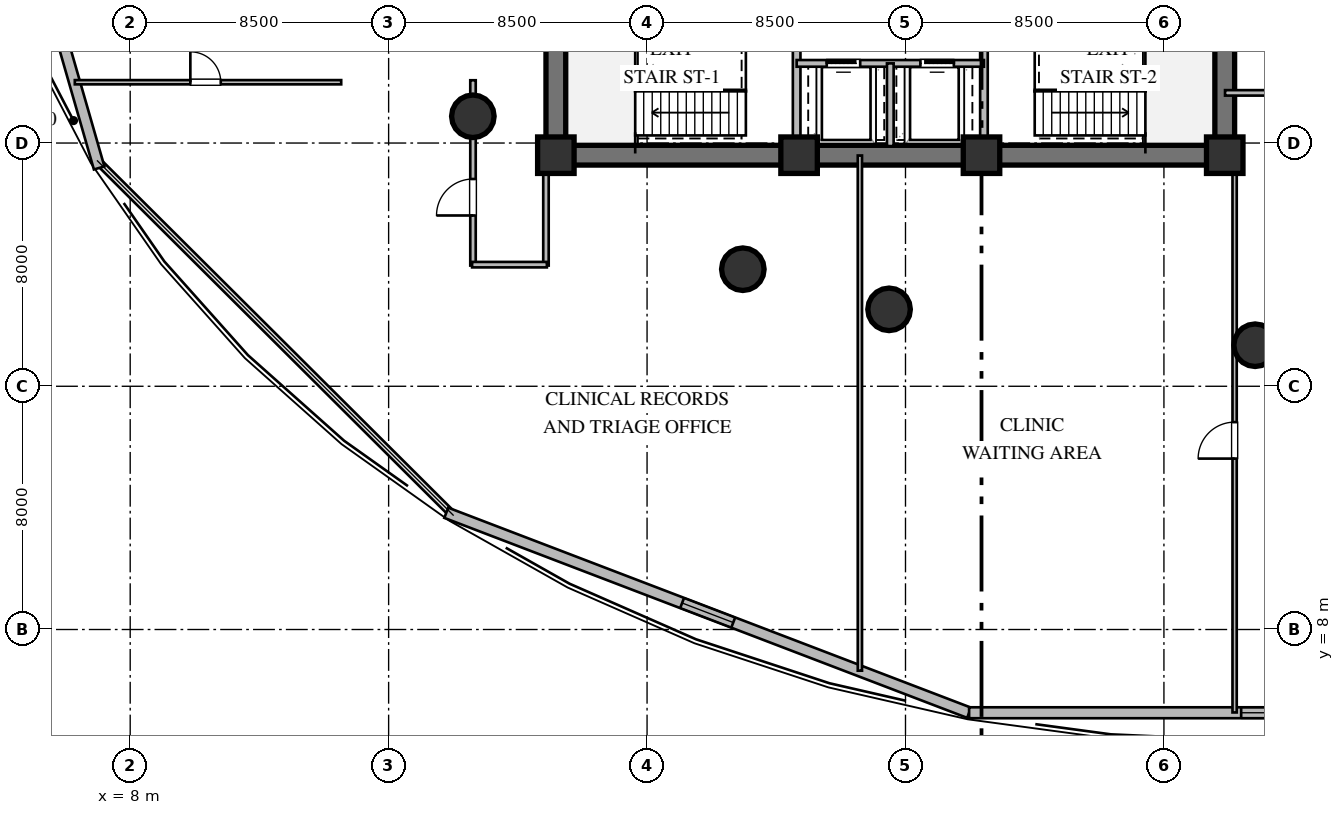
"""IFC4 building model, lengths in metres.
Left out: names, types, materials, properties, quantities, classifications, styles, units other than length and angle.
Written with IfcOpenShell. Run it as: python <this file> out.ifc"""

import sys

from ifc_helpers import new_model, si_unit, direction, frame, frame_2d, origin, origin_2d, place, context, subcontext, project, spatial, rectangle, circle, extrude, element, fill, save


model = new_model("IFC4")
c1 = context("Model", 3, precision=1e-05, world=origin(), true_north=direction((0.0, 1.0)))
c2 = subcontext(c1, "Body", "Model", "MODEL_VIEW")
j1 = project(units=[si_unit("LENGTHUNIT", "METRE"), si_unit("PLANEANGLEUNIT", "RADIAN")], contexts=[c1])
p1 = place(None, origin())
s1 = spatial("IfcSite", under=j1, at=p1, CompositionType="ELEMENT")
p2 = place(p1, origin())
s2 = spatial("IfcBuilding", under=s1, at=p2, CompositionType="ELEMENT")
p3 = place(p2, frame((0.0, 0.0, 19.2)))
s3 = spatial("IfcBuildingStorey", under=s2, at=p3, CompositionType="ELEMENT", Elevation=19.2)
p4 = place(p3, frame((21.675, 23.6, 0.0), z_axis=(0.0, 0.0, 1.0), x_axis=(1.0, 0.0, 0.0)))
e1 = element("IfcWall", 1, at=p4, inside=s3, PredefinedType="SHEAR", context=c2, shape_type="SweptSolid", body=[
    extrude(rectangle(XDim=22.65, YDim=0.65, at=frame_2d((11.325, 0.0))), origin(), (0.0, 0.0, 1.0), 4.56),
])
p5 = place(p3, frame((22.0, 23.925, 0.0), z_axis=(0.0, 0.0, 1.0), x_axis=(0.0, 1.0, 0.0)))
e2 = element("IfcWall", 2, at=p5, inside=s3, PredefinedType="SHEAR", context=c2, shape_type="SweptSolid", body=[
    extrude(rectangle(XDim=12.15, YDim=0.65, at=frame_2d((6.075, 0.0))), origin(), (0.0, 0.0, 1.0), 4.56),
])
p6 = place(p3, frame((44.0, 23.925, 0.0), z_axis=(0.0, 0.0, 1.0), x_axis=(0.0, 1.0, 0.0)))
e3 = element("IfcWall", 3, at=p6, inside=s3, PredefinedType="SHEAR", context=c2, shape_type="SweptSolid", body=[
    extrude(rectangle(XDim=12.15, YDim=0.65, at=frame_2d((6.075, 0.0))), origin(), (0.0, 0.0, 1.0), 4.56),
])
p7 = place(p6, frame((8.775, 0.0, 0.0)))
e4 = element("IfcOpeningElement", 4, at=p7, cuts=e3, PredefinedType="OPENING", context=c2, shape_type="SweptSolid", body=[
    extrude(rectangle(XDim=1.5, YDim=2.15, at=frame_2d((0.75, 1.075))), frame((0.0, 0.335, 0.0), z_axis=(0.0, -1.0, 0.0), x_axis=(1.0, 0.0, 0.0)), (0.0, 0.0, 1.0), 0.67),
])
for number, where, z_axis, x_axis in (
    (5, (22.0, 23.6, 0.0), (0.0, 0.0, 1.0), (1.0, 0.0, 0.0)),
    (6, (30.0, 23.6, 0.0), (0.0, 0.0, 1.0), (1.0, 0.0, 0.0)),
    (7, (36.0, 23.6, 0.0), (0.0, 0.0, 1.0), (1.0, 0.0, 0.0)),
    (8, (44.0, 23.6, 0.0), (0.0, 0.0, 1.0), (1.0, 0.0, 0.0)),
):
    element("IfcColumn", number, at=place(p3, frame(where, z_axis=z_axis, x_axis=x_axis)), inside=s3, PredefinedType="COLUMN", context=c2, shape_type="SweptSolid", body=[
        extrude(rectangle(XDim=1.2, YDim=1.2, at=origin_2d()), origin(), (0.0, 0.0, 1.0), 4.8),
    ])
for number, where, z_axis, x_axis in (
    (9, (19.27, 24.88, 0.0), (0.0, 0.0, 1.0), (1.0, 0.0, 0.0)),
    (10, (28.15, 19.85, 0.0), (0.0, 0.0, 1.0), (1.0, 0.0, 0.0)),
    (11, (32.96, 18.53, 0.0), (0.0, 0.0, 1.0), (1.0, 0.0, 0.0)),
    (12, (45.0, 17.35, 0.0), (0.0, 0.0, 1.0), (1.0, 0.0, 0.0)),
):
    element("IfcColumn", number, at=place(p3, frame(where, z_axis=z_axis, x_axis=x_axis)), inside=s3, PredefinedType="COLUMN", context=c2, shape_type="SweptSolid", body=[
        extrude(circle(Radius=0.7, at=origin_2d()), origin(), (0.0, 0.0, 1.0), 4.8),
    ])
p8 = place(p3, frame((2.72, 38.0, 0.0), z_axis=(0.0, 0.0, 1.0), x_axis=(0.276203409751, -0.961099202186, 0.0)))
e13 = element("IfcWall", 13, at=p8, inside=s3, PredefinedType="STANDARD", context=c2, shape_type="SweptSolid", body=[
    extrude(rectangle(XDim=15.42, YDim=0.36, at=frame_2d((7.71, 0.0))), origin(), (0.0, 0.0, 1.0), 4.56),
])
p9 = place(p8, frame((6.81, 0.0, 1.05)))
e14 = element("IfcOpeningElement", 14, at=p9, cuts=e13, PredefinedType="OPENING", context=c2, shape_type="SweptSolid", body=[
    extrude(rectangle(XDim=1.8, YDim=1.7, at=frame_2d((0.9, 0.85))), frame((0.0, 0.19, 0.0), z_axis=(0.0, -1.0, 0.0), x_axis=(1.0, 0.0, 0.0)), (0.0, 0.0, 1.0), 0.38),
])
p10 = place(p3, frame((18.396, 11.839, 0.0), z_axis=(0.0, 0.0, 1.0), x_axis=(0.934012147289, -0.357241247221, 0.0)))
e15 = element("IfcWall", 15, at=p10, inside=s3, PredefinedType="STANDARD", context=c2, shape_type="SweptSolid", body=[
    extrude(rectangle(XDim=18.411, YDim=0.36, at=frame_2d((9.206, 0.0))), origin(), (0.0, 0.0, 1.0), 4.56),
])
p11 = place(p10, frame((8.305, 0.0, 1.05)))
e16 = element("IfcOpeningElement", 16, at=p11, cuts=e15, PredefinedType="OPENING", context=c2, shape_type="SweptSolid", body=[
    extrude(rectangle(XDim=1.8, YDim=1.7, at=frame_2d((0.9, 0.85))), frame((0.0, 0.19, 0.0), z_axis=(0.0, -1.0, 0.0), x_axis=(1.0, 0.0, 0.0)), (0.0, 0.0, 1.0), 0.38),
])
p12 = place(p3, frame((35.592, 5.262, 0.0), z_axis=(0.0, 0.0, 1.0), x_axis=(1.0, 0.0, 0.0)))
e17 = element("IfcWall", 17, at=p12, inside=s3, PredefinedType="STANDARD", context=c2, shape_type="SweptSolid", body=[
    extrude(rectangle(XDim=18.816, YDim=0.36, at=frame_2d((9.408, 0.0))), origin(), (0.0, 0.0, 1.0), 4.56),
])
p13 = place(p12, frame((8.948, 0.0, 1.05)))
e18 = element("IfcOpeningElement", 18, at=p13, cuts=e17, PredefinedType="OPENING", context=c2, shape_type="SweptSolid", body=[
    extrude(rectangle(XDim=1.8, YDim=1.7, at=frame_2d((0.9, 0.85))), frame((0.0, 0.19, 0.0), z_axis=(0.0, -1.0, 0.0), x_axis=(1.0, 0.0, 0.0)), (0.0, 0.0, 1.0), 0.38),
])
p14 = place(p3, frame((29.92, 23.9, 0.0), z_axis=(0.0, 0.0, 1.0), x_axis=(0.0, 1.0, 0.0)))
e19 = element("IfcWall", 19, at=p14, inside=s3, PredefinedType="SOLIDWALL", context=c2, shape_type="SweptSolid", body=[
    extrude(rectangle(XDim=5.4, YDim=0.25, at=frame_2d((2.7, 0.0))), origin(), (0.0, 0.0, 1.0), 4.56),
])
p15 = place(p14, frame((3.421, 0.0, 0.0)))
e20 = element("IfcOpeningElement", 20, at=p15, cuts=e19, PredefinedType="OPENING", context=c2, shape_type="SweptSolid", body=[
    extrude(rectangle(XDim=1.15, YDim=2.1, at=frame_2d((0.575, 1.05))), frame((0.0, 0.135, 0.0), z_axis=(0.0, -1.0, 0.0), x_axis=(1.0, 0.0, 0.0)), (0.0, 0.0, 1.0), 0.27),
])
p16 = place(p3, frame((36.08, 23.9, 0.0), z_axis=(0.0, 0.0, 1.0), x_axis=(0.0, 1.0, 0.0)))
e21 = element("IfcWall", 21, at=p16, inside=s3, PredefinedType="SOLIDWALL", context=c2, shape_type="SweptSolid", body=[
    extrude(rectangle(XDim=5.4, YDim=0.25, at=frame_2d((2.7, 0.0))), origin(), (0.0, 0.0, 1.0), 4.56),
])
p17 = place(p16, frame((3.421, 0.0, 0.0)))
e22 = element("IfcOpeningElement", 22, at=p17, cuts=e21, PredefinedType="OPENING", context=c2, shape_type="SweptSolid", body=[
    extrude(rectangle(XDim=1.15, YDim=2.1, at=frame_2d((0.575, 1.05))), frame((0.0, 0.135, 0.0), z_axis=(0.0, -1.0, 0.0), x_axis=(1.0, 0.0, 0.0)), (0.0, 0.0, 1.0), 0.27),
])
p18 = place(p3, frame((29.92, 26.62, 0.0), z_axis=(0.0, 0.0, 1.0), x_axis=(1.0, 0.0, 0.0)))
e23 = element("IfcWall", 23, at=p18, inside=s3, PredefinedType="SOLIDWALL", context=c2, shape_type="SweptSolid", body=[
    extrude(rectangle(XDim=6.16, YDim=0.22, at=frame_2d((3.08, 0.0))), origin(), (0.0, 0.0, 1.0), 4.56),
])
p19 = place(p18, frame((0.99, 0.0, 0.0)))
e24 = element("IfcOpeningElement", 24, at=p19, cuts=e23, PredefinedType="OPENING", context=c2, shape_type="SweptSolid", body=[
    extrude(rectangle(XDim=1.1, YDim=2.1, at=frame_2d((0.55, 1.05))), frame((0.0, 0.12, 0.0), z_axis=(0.0, -1.0, 0.0), x_axis=(1.0, 0.0, 0.0)), (0.0, 0.0, 1.0), 0.24),
])
p20 = place(p18, frame((4.07, 0.0, 0.0)))
e25 = element("IfcOpeningElement", 25, at=p20, cuts=e23, PredefinedType="OPENING", context=c2, shape_type="SweptSolid", body=[
    extrude(rectangle(XDim=1.1, YDim=2.1, at=frame_2d((0.55, 1.05))), frame((0.0, 0.12, 0.0), z_axis=(0.0, -1.0, 0.0), x_axis=(1.0, 0.0, 0.0)), (0.0, 0.0, 1.0), 0.24),
])
p21 = place(p3, frame((33.0, 23.9, 0.0), z_axis=(0.0, 0.0, 1.0), x_axis=(0.0, 1.0, 0.0)))
e26 = element("IfcWall", 26, at=p21, inside=s3, PredefinedType="SOLIDWALL", context=c2, shape_type="SweptSolid", body=[
    extrude(rectangle(XDim=2.72, YDim=0.22, at=frame_2d((1.36, 0.0))), origin(), (0.0, 0.0, 1.0), 4.56),
])
p22 = place(p3, frame((62.415, 25.65, 0.0), z_axis=(0.0, 0.0, 1.0), x_axis=(-1.0, 0.0, 0.0)))
e27 = element("IfcWall", 27, at=p22, inside=s3, PredefinedType="PARTITIONING", context=c2, shape_type="SweptSolid", body=[
    extrude(rectangle(XDim=18.405, YDim=0.18, at=frame_2d((9.203, 0.0))), origin(), (0.0, 0.0, 1.0), 4.006),
])
p23 = place(p22, frame((8.46, 0.0, 0.0)))
e28 = element("IfcOpeningElement", 28, at=p23, cuts=e27, PredefinedType="OPENING", context=c2, shape_type="SweptSolid", body=[
    extrude(rectangle(XDim=1.2, YDim=2.15, at=frame_2d((0.6, 1.075))), frame((0.0, 0.1, 0.0), z_axis=(0.0, -1.0, 0.0), x_axis=(1.0, 0.0, 0.0)), (0.0, 0.0, 1.0), 0.2),
])
p24 = place(p3, frame((19.275, 19.97, 0.0), z_axis=(0.0, 0.0, 1.0), x_axis=(0.0, 1.0, 0.0)))
e29 = element("IfcWall", 29, at=p24, inside=s3, PredefinedType="PARTITIONING", context=c2, shape_type="SweptSolid", body=[
    extrude(rectangle(XDim=6.095, YDim=0.18, at=frame_2d((3.047, 0.0))), origin(), (0.0, 0.0, 1.0), 3.938),
])
p25 = place(p24, frame((1.647, 0.0, 0.0)))
e30 = element("IfcOpeningElement", 30, at=p25, cuts=e29, PredefinedType="OPENING", context=c2, shape_type="SweptSolid", body=[
    extrude(rectangle(XDim=1.2, YDim=2.15, at=frame_2d((0.6, 1.075))), frame((0.0, 0.1, 0.0), z_axis=(0.0, -1.0, 0.0), x_axis=(1.0, 0.0, 0.0)), (0.0, 0.0, 1.0), 0.2),
])
p26 = place(p3, frame((21.675, 23.59, 0.0), z_axis=(0.0, 0.0, 1.0), x_axis=(0.0, -1.0, 0.0)))
e31 = element("IfcWall", 31, at=p26, inside=s3, PredefinedType="PARTITIONING", context=c2, shape_type="SweptSolid", body=[
    extrude(rectangle(XDim=3.62, YDim=0.18, at=frame_2d((1.81, 0.0))), origin(), (0.0, 0.0, 1.0), 3.7),
])
p27 = place(p3, frame((21.705, 20.0, 0.0), z_axis=(0.0, 0.0, 1.0), x_axis=(-1.0, 0.0, 0.0)))
e32 = element("IfcWall", 32, at=p27, inside=s3, PredefinedType="PARTITIONING", context=c2, shape_type="SweptSolid", body=[
    extrude(rectangle(XDim=2.46, YDim=0.18, at=frame_2d((1.23, 0.0))), origin(), (0.0, 0.0, 1.0), 4.56),
])
p28 = place(p3, frame((44.325, 5.272, 0.0), z_axis=(0.0, 0.0, 1.0), x_axis=(0.0, 1.0, 0.0)))
e33 = element("IfcWall", 33, at=p28, inside=s3, PredefinedType="PARTITIONING", context=c2, shape_type="SweptSolid", body=[
    extrude(rectangle(XDim=18.318, YDim=0.14, at=frame_2d((9.159, 0.0))), origin(), (0.0, 0.0, 1.0), 3.7),
])
p29 = place(p28, frame((8.349, 0.0, 0.0)))
e34 = element("IfcOpeningElement", 34, at=p29, cuts=e33, PredefinedType="OPENING", context=c2, shape_type="SweptSolid", body=[
    extrude(rectangle(XDim=1.2, YDim=2.15, at=frame_2d((0.6, 1.075))), frame((0.0, 0.08, 0.0), z_axis=(0.0, -1.0, 0.0), x_axis=(1.0, 0.0, 0.0)), (0.0, 0.0, 1.0), 0.16),
])
p30 = place(p3, frame((6.179, 26.0, 0.0), z_axis=(0.0, 0.0, 1.0), x_axis=(1.0, 0.0, 0.0)))
e35 = element("IfcWall", 35, at=p30, inside=s3, PredefinedType="PARTITIONING", context=c2, shape_type="SweptSolid", body=[
    extrude(rectangle(XDim=8.761, YDim=0.14, at=frame_2d((4.381, 0.0))), origin(), (0.0, 0.0, 1.0), 4.56),
])
p31 = place(p30, frame((3.8, 0.0, 0.0)))
e36 = element("IfcOpeningElement", 36, at=p31, cuts=e35, PredefinedType="OPENING", context=c2, shape_type="SweptSolid", body=[
    extrude(rectangle(XDim=1.0, YDim=2.1, at=frame_2d((0.5, 1.05))), frame((0.0, 0.08, 0.0), z_axis=(0.0, -1.0, 0.0), x_axis=(1.0, 0.0, 0.0)), (0.0, 0.0, 1.0), 0.16),
])
p32 = place(p3, frame((32.0, 23.59, 0.0), z_axis=(0.0, 0.0, 1.0), x_axis=(0.0, -1.0, 0.0)))
e37 = element("IfcWall", 37, at=p32, inside=s3, PredefinedType="PARTITIONING", context=c2, shape_type="SweptSolid", body=[
    extrude(rectangle(XDim=16.944, YDim=0.14, at=frame_2d((8.472, 0.0))), origin(), (0.0, 0.0, 1.0), 4.56),
])
p33 = place(p11, origin())
e38 = element("IfcWindow", 38, at=p33, inside=s3, PartitioningType="SINGLE_PANEL", PredefinedType="WINDOW", context=c2, shape_type="SweptSolid", body=[
    extrude(rectangle(XDim=1.8, YDim=1.7, at=frame_2d((0.9, 0.85))), frame((0.0, 0.03, 0.0), z_axis=(0.0, -1.0, 0.0), x_axis=(1.0, 0.0, 0.0)), (0.0, 0.0, 1.0), 0.06),
])
fill(e16, e38)
p34 = place(p13, origin())
e39 = element("IfcWindow", 39, at=p34, inside=s3, PartitioningType="SINGLE_PANEL", PredefinedType="WINDOW", context=c2, shape_type="SweptSolid", body=[
    extrude(rectangle(XDim=1.8, YDim=1.7, at=frame_2d((0.9, 0.85))), frame((0.0, 0.03, 0.0), z_axis=(0.0, -1.0, 0.0), x_axis=(1.0, 0.0, 0.0)), (0.0, 0.0, 1.0), 0.06),
])
fill(e18, e39)
p35 = place(p19, origin())
e40 = element("IfcDoor", 40, at=p35, inside=s3, OperationType="SLIDING_TO_LEFT", PredefinedType="DOOR", context=c2, shape_type="SweptSolid", body=[
    extrude(rectangle(XDim=1.1, YDim=2.1, at=frame_2d((0.55, 1.05))), frame((0.0, 0.025, 0.0), z_axis=(0.0, -1.0, 0.0), x_axis=(1.0, 0.0, 0.0)), (0.0, 0.0, 1.0), 0.05),
])
fill(e24, e40)
p36 = place(p20, origin())
e41 = element("IfcDoor", 41, at=p36, inside=s3, OperationType="SLIDING_TO_RIGHT", PredefinedType="DOOR", context=c2, shape_type="SweptSolid", body=[
    extrude(rectangle(XDim=1.1, YDim=2.1, at=frame_2d((0.55, 1.05))), frame((0.0, 0.025, 0.0), z_axis=(0.0, -1.0, 0.0), x_axis=(1.0, 0.0, 0.0)), (0.0, 0.0, 1.0), 0.05),
])
fill(e25, e41)
p37 = place(p25, origin())
e42 = element("IfcDoor", 42, at=p37, inside=s3, OperationType="SINGLE_SWING_LEFT", PredefinedType="DOOR", context=c2, shape_type="SweptSolid", body=[
    extrude(rectangle(XDim=1.2, YDim=2.15, at=frame_2d((0.6, 1.075))), frame((0.0, 0.025, 0.0), z_axis=(0.0, -1.0, 0.0), x_axis=(1.0, 0.0, 0.0)), (0.0, 0.0, 1.0), 0.05),
])
fill(e30, e42)
p38 = place(p29, origin())
e43 = element("IfcDoor", 43, at=p38, inside=s3, OperationType="SINGLE_SWING_LEFT", PredefinedType="DOOR", context=c2, shape_type="SweptSolid", body=[
    extrude(rectangle(XDim=1.2, YDim=2.15, at=frame_2d((0.6, 1.075))), frame((0.0, 0.025, 0.0), z_axis=(0.0, -1.0, 0.0), x_axis=(1.0, 0.0, 0.0)), (0.0, 0.0, 1.0), 0.05),
])
fill(e34, e43)
p39 = place(p31, origin())
e44 = element("IfcDoor", 44, at=p39, inside=s3, OperationType="SINGLE_SWING_LEFT", PredefinedType="DOOR", context=c2, shape_type="SweptSolid", body=[
    extrude(rectangle(XDim=1.0, YDim=2.1, at=frame_2d((0.5, 1.05))), frame((0.0, 0.025, 0.0), z_axis=(0.0, -1.0, 0.0), x_axis=(1.0, 0.0, 0.0)), (0.0, 0.0, 1.0), 0.05),
])
fill(e36, e44)
save(model, sys.argv[1])
